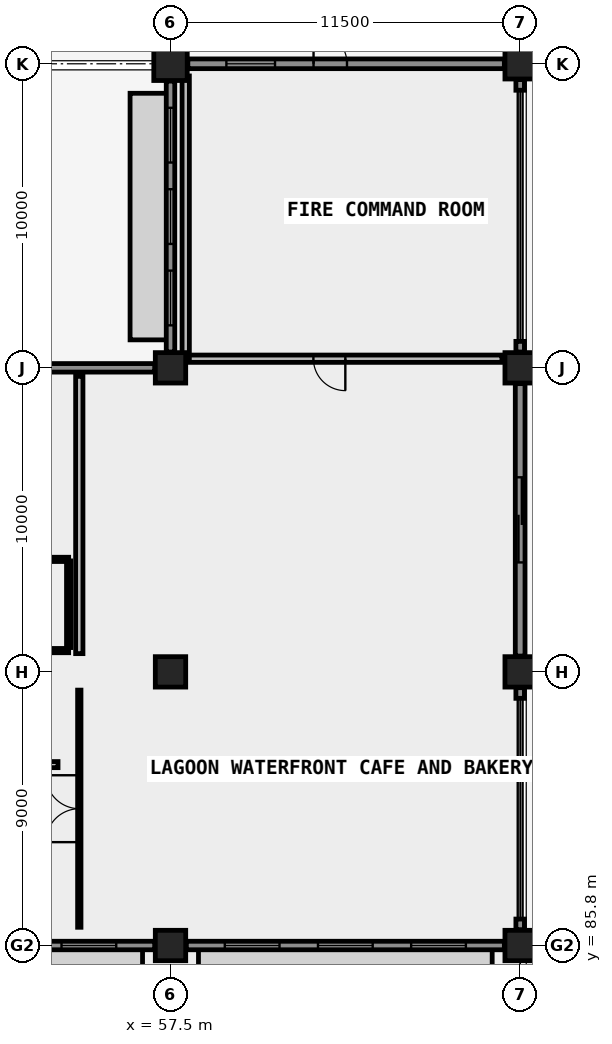
"""IFC4 building model, lengths in metres.
Left out: names, types, materials, properties, quantities, classifications, styles, units other than length and angle.
Written with IfcOpenShell. Run it as: python <this file> out.ifc"""

import sys

from ifc_helpers import new_model, si_unit, direction, frame, frame_2d, origin, origin_2d, place, context, subcontext, project, spatial, rectangle, extrude, element, fill, save


model = new_model("IFC4")
c1 = context("Model", 3, precision=1e-05, world=origin(), true_north=direction((0.0, 1.0)))
c2 = subcontext(c1, "Body", "Model", "MODEL_VIEW")
j1 = project(units=[si_unit("LENGTHUNIT", "METRE"), si_unit("PLANEANGLEUNIT", "RADIAN")], contexts=[c1])
p1 = place(None, origin())
s1 = spatial("IfcSite", under=j1, at=p1, CompositionType="ELEMENT")
p2 = place(p1, origin())
s2 = spatial("IfcBuilding", under=s1, at=p2, CompositionType="ELEMENT")
p3 = place(p2, origin())
s3 = spatial("IfcBuildingStorey", under=s2, at=p3, CompositionType="ELEMENT", Elevation=0.0)
for number, where, z_axis, x_axis in (
    (1, (57.5, 85.8, 0.0), (0.0, 0.0, 1.0), (1.0, 0.0, 0.0)),
    (2, (57.5, 94.8, 0.0), (0.0, 0.0, 1.0), (1.0, 0.0, 0.0)),
    (3, (57.5, 104.8, 0.0), (0.0, 0.0, 1.0), (1.0, 0.0, 0.0)),
):
    element("IfcColumn", number, at=place(p3, frame(where, z_axis=z_axis, x_axis=x_axis)), inside=s3, PredefinedType="COLUMN", context=c2, shape_type="SweptSolid", body=[
        extrude(rectangle(XDim=1.0, YDim=1.0, at=origin_2d()), origin(), (0.0, 0.0, 1.0), 4.2),
    ])
p4 = place(p3, frame((57.5, 114.8, 0.0), z_axis=(0.0, 0.0, 1.0), x_axis=(1.0, 0.0, 0.0)))
e4 = element("IfcColumn", 4, at=p4, inside=s3, PredefinedType="COLUMN", context=c2, shape_type="SweptSolid", body=[
    extrude(rectangle(XDim=1.1, YDim=1.1, at=origin_2d()), origin(), (0.0, 0.0, 1.0), 4.2),
])
for number, where, z_axis, x_axis in (
    (5, (69.0, 85.8, 0.0), (0.0, 0.0, 1.0), (1.0, 0.0, 0.0)),
    (6, (69.0, 94.8, 0.0), (0.0, 0.0, 1.0), (1.0, 0.0, 0.0)),
    (7, (69.0, 104.8, 0.0), (0.0, 0.0, 1.0), (1.0, 0.0, 0.0)),
    (8, (69.0, 114.8, 0.0), (0.0, 0.0, 1.0), (1.0, 0.0, 0.0)),
):
    element("IfcColumn", number, at=place(p3, frame(where, z_axis=z_axis, x_axis=x_axis)), inside=s3, PredefinedType="COLUMN", context=c2, shape_type="SweptSolid", body=[
        extrude(rectangle(XDim=1.0, YDim=1.0, at=origin_2d()), origin(), (0.0, 0.0, 1.0), 4.2),
    ])
p5 = place(p3, frame((46.52, 85.8, 0.0), z_axis=(0.0, 0.0, 1.0), x_axis=(1.0, 0.0, 0.0)))
e9 = element("IfcWall", 9, at=p5, inside=s3, PredefinedType="SOLIDWALL", context=c2, shape_type="SweptSolid", body=[
    extrude(rectangle(XDim=10.46, YDim=0.28, at=frame_2d((5.23, 0.0))), origin(), (0.0, 0.0, 1.0), 3.15),
])
p6 = place(p5, frame((1.265, 0.0, 0.85)))
e10 = element("IfcOpeningElement", 10, at=p6, cuts=e9, PredefinedType="OPENING", context=c2, shape_type="SweptSolid", body=[
    extrude(rectangle(XDim=1.8, YDim=1.95, at=frame_2d((0.9, 0.975))), frame((0.0, 0.15, 0.0), z_axis=(0.0, -1.0, 0.0), x_axis=(1.0, 0.0, 0.0)), (0.0, 0.0, 1.0), 0.3),
])
p7 = place(p5, frame((4.33, 0.0, 0.85)))
e11 = element("IfcOpeningElement", 11, at=p7, cuts=e9, PredefinedType="OPENING", context=c2, shape_type="SweptSolid", body=[
    extrude(rectangle(XDim=1.8, YDim=1.95, at=frame_2d((0.9, 0.975))), frame((0.0, 0.15, 0.0), z_axis=(0.0, -1.0, 0.0), x_axis=(1.0, 0.0, 0.0)), (0.0, 0.0, 1.0), 0.3),
])
p8 = place(p5, frame((7.395, 0.0, 0.85)))
e12 = element("IfcOpeningElement", 12, at=p8, cuts=e9, PredefinedType="OPENING", context=c2, shape_type="SweptSolid", body=[
    extrude(rectangle(XDim=1.8, YDim=1.95, at=frame_2d((0.9, 0.975))), frame((0.0, 0.15, 0.0), z_axis=(0.0, -1.0, 0.0), x_axis=(1.0, 0.0, 0.0)), (0.0, 0.0, 1.0), 0.3),
])
p9 = place(p3, frame((58.02, 85.8, 0.0), z_axis=(0.0, 0.0, 1.0), x_axis=(1.0, 0.0, 0.0)))
e13 = element("IfcWall", 13, at=p9, inside=s3, PredefinedType="SOLIDWALL", context=c2, shape_type="SweptSolid", body=[
    extrude(rectangle(XDim=10.46, YDim=0.28, at=frame_2d((5.23, 0.0))), origin(), (0.0, 0.0, 1.0), 3.15),
])
p10 = place(p9, frame((1.265, 0.0, 0.85)))
e14 = element("IfcOpeningElement", 14, at=p10, cuts=e13, PredefinedType="OPENING", context=c2, shape_type="SweptSolid", body=[
    extrude(rectangle(XDim=1.8, YDim=1.95, at=frame_2d((0.9, 0.975))), frame((0.0, 0.15, 0.0), z_axis=(0.0, -1.0, 0.0), x_axis=(1.0, 0.0, 0.0)), (0.0, 0.0, 1.0), 0.3),
])
p11 = place(p9, frame((4.33, 0.0, 0.85)))
e15 = element("IfcOpeningElement", 15, at=p11, cuts=e13, PredefinedType="OPENING", context=c2, shape_type="SweptSolid", body=[
    extrude(rectangle(XDim=1.8, YDim=1.95, at=frame_2d((0.9, 0.975))), frame((0.0, 0.15, 0.0), z_axis=(0.0, -1.0, 0.0), x_axis=(1.0, 0.0, 0.0)), (0.0, 0.0, 1.0), 0.3),
])
p12 = place(p9, frame((7.395, 0.0, 0.85)))
e16 = element("IfcOpeningElement", 16, at=p12, cuts=e13, PredefinedType="OPENING", context=c2, shape_type="SweptSolid", body=[
    extrude(rectangle(XDim=1.8, YDim=1.95, at=frame_2d((0.9, 0.975))), frame((0.0, 0.15, 0.0), z_axis=(0.0, -1.0, 0.0), x_axis=(1.0, 0.0, 0.0)), (0.0, 0.0, 1.0), 0.3),
])
p13 = place(p3, frame((69.0, 86.32, 0.0), z_axis=(0.0, 0.0, 1.0), x_axis=(0.0, 1.0, 0.0)))
e17 = element("IfcWall", 17, at=p13, inside=s3, PredefinedType="SOLIDWALL", context=c2, shape_type="SweptSolid", body=[
    extrude(rectangle(XDim=0.35, YDim=0.28, at=frame_2d((0.175, 0.0))), origin(), (0.0, 0.0, 1.0), 3.93),
])
p14 = place(p3, frame((69.0, 93.93, 0.0), z_axis=(0.0, 0.0, 1.0), x_axis=(0.0, 1.0, 0.0)))
e18 = element("IfcWall", 18, at=p14, inside=s3, PredefinedType="SOLIDWALL", context=c2, shape_type="SweptSolid", body=[
    extrude(rectangle(XDim=0.35, YDim=0.28, at=frame_2d((0.175, 0.0))), origin(), (0.0, 0.0, 1.0), 3.93),
])
p15 = place(p3, frame((69.0, 95.32, 0.0), z_axis=(0.0, 0.0, 1.0), x_axis=(0.0, 1.0, 0.0)))
e19 = element("IfcWall", 19, at=p15, inside=s3, PredefinedType="SOLIDWALL", context=c2, shape_type="SweptSolid", body=[
    extrude(rectangle(XDim=8.96, YDim=0.32, at=frame_2d((4.48, 0.0))), origin(), (0.0, 0.0, 1.0), 3.15),
])
p16 = place(p15, frame((3.08, 0.0, 0.0)))
e20 = element("IfcOpeningElement", 20, at=p16, cuts=e19, PredefinedType="OPENING", context=c2, shape_type="SweptSolid", body=[
    extrude(rectangle(XDim=2.8, YDim=2.45, at=frame_2d((1.4, 1.225))), frame((0.0, 0.17, 0.0), z_axis=(0.0, -1.0, 0.0), x_axis=(1.0, 0.0, 0.0)), (0.0, 0.0, 1.0), 0.34),
])
p17 = place(p3, frame((69.0, 105.32, 0.0), z_axis=(0.0, 0.0, 1.0), x_axis=(0.0, 1.0, 0.0)))
e21 = element("IfcWall", 21, at=p17, inside=s3, PredefinedType="SOLIDWALL", context=c2, shape_type="SweptSolid", body=[
    extrude(rectangle(XDim=0.35, YDim=0.28, at=frame_2d((0.175, 0.0))), origin(), (0.0, 0.0, 1.0), 3.93),
])
p18 = place(p3, frame((69.0, 113.93, 0.0), z_axis=(0.0, 0.0, 1.0), x_axis=(0.0, 1.0, 0.0)))
e22 = element("IfcWall", 22, at=p18, inside=s3, PredefinedType="SOLIDWALL", context=c2, shape_type="SweptSolid", body=[
    extrude(rectangle(XDim=0.35, YDim=0.28, at=frame_2d((0.175, 0.0))), origin(), (0.0, 0.0, 1.0), 3.93),
])
p19 = place(p3, frame((58.07, 114.8, 0.0), z_axis=(0.0, 0.0, 1.0), x_axis=(1.0, 0.0, 0.0)))
e23 = element("IfcWall", 23, at=p19, inside=s3, PredefinedType="SOLIDWALL", context=c2, shape_type="SweptSolid", body=[
    extrude(rectangle(XDim=10.41, YDim=0.32, at=frame_2d((5.205, 0.0))), origin(), (0.0, 0.0, 1.0), 3.15),
])
p20 = place(p19, frame((4.135, 0.0, 0.0)))
e24 = element("IfcOpeningElement", 24, at=p20, cuts=e23, PredefinedType="OPENING", context=c2, shape_type="SweptSolid", body=[
    extrude(rectangle(XDim=1.1, YDim=2.15, at=frame_2d((0.55, 1.075))), frame((0.0, 0.17, 0.0), z_axis=(0.0, -1.0, 0.0), x_axis=(1.0, 0.0, 0.0)), (0.0, 0.0, 1.0), 0.34),
])
p21 = place(p19, frame((1.267, 0.0, 0.78)))
e25 = element("IfcOpeningElement", 25, at=p21, cuts=e23, PredefinedType="OPENING", context=c2, shape_type="SweptSolid", body=[
    extrude(rectangle(XDim=1.6, YDim=1.4, at=frame_2d((0.8, 0.7))), frame((0.0, 0.17, 0.0), z_axis=(0.0, -1.0, 0.0), x_axis=(1.0, 0.0, 0.0)), (0.0, 0.0, 1.0), 0.34),
])
p22 = place(p3, frame((57.5, 105.32, 0.0), z_axis=(0.0, 0.0, 1.0), x_axis=(0.0, 1.0, 0.0)))
e26 = element("IfcWall", 26, at=p22, inside=s3, PredefinedType="SOLIDWALL", context=c2, shape_type="SweptSolid", body=[
    extrude(rectangle(XDim=8.91, YDim=0.28, at=frame_2d((4.455, 0.0))), origin(), (0.0, 0.0, 1.0), 3.15),
])
p23 = place(p22, frame((0.877, 0.0, 0.85)))
e27 = element("IfcOpeningElement", 27, at=p23, cuts=e26, PredefinedType="OPENING", context=c2, shape_type="SweptSolid", body=[
    extrude(rectangle(XDim=1.8, YDim=1.95, at=frame_2d((0.9, 0.975))), frame((0.0, 0.15, 0.0), z_axis=(0.0, -1.0, 0.0), x_axis=(1.0, 0.0, 0.0)), (0.0, 0.0, 1.0), 0.3),
])
p24 = place(p22, frame((3.555, 0.0, 0.85)))
e28 = element("IfcOpeningElement", 28, at=p24, cuts=e26, PredefinedType="OPENING", context=c2, shape_type="SweptSolid", body=[
    extrude(rectangle(XDim=1.8, YDim=1.95, at=frame_2d((0.9, 0.975))), frame((0.0, 0.15, 0.0), z_axis=(0.0, -1.0, 0.0), x_axis=(1.0, 0.0, 0.0)), (0.0, 0.0, 1.0), 0.3),
])
p25 = place(p22, frame((6.232, 0.0, 0.85)))
e29 = element("IfcOpeningElement", 29, at=p25, cuts=e26, PredefinedType="OPENING", context=c2, shape_type="SweptSolid", body=[
    extrude(rectangle(XDim=1.8, YDim=1.95, at=frame_2d((0.9, 0.975))), frame((0.0, 0.15, 0.0), z_axis=(0.0, -1.0, 0.0), x_axis=(1.0, 0.0, 0.0)), (0.0, 0.0, 1.0), 0.3),
])
p26 = place(p3, frame((46.52, 104.8, 0.0), z_axis=(0.0, 0.0, 1.0), x_axis=(1.0, 0.0, 0.0)))
e30 = element("IfcWall", 30, at=p26, inside=s3, PredefinedType="SOLIDWALL", context=c2, shape_type="SweptSolid", body=[
    extrude(rectangle(XDim=10.46, YDim=0.28, at=frame_2d((5.23, 0.0))), origin(), (0.0, 0.0, 1.0), 3.15),
])
p27 = place(p26, frame((4.23, 0.0, 0.0)))
e31 = element("IfcOpeningElement", 31, at=p27, cuts=e30, PredefinedType="OPENING", context=c2, shape_type="SweptSolid", body=[
    extrude(rectangle(XDim=2.0, YDim=2.4, at=frame_2d((1.0, 1.2))), frame((0.0, 0.15, 0.0), z_axis=(0.0, -1.0, 0.0), x_axis=(1.0, 0.0, 0.0)), (0.0, 0.0, 1.0), 0.3),
])
p28 = place(p26, frame((1.215, 0.0, 0.78)))
e32 = element("IfcOpeningElement", 32, at=p28, cuts=e30, PredefinedType="OPENING", context=c2, shape_type="SweptSolid", body=[
    extrude(rectangle(XDim=1.8, YDim=1.95, at=frame_2d((0.9, 0.975))), frame((0.0, 0.15, 0.0), z_axis=(0.0, -1.0, 0.0), x_axis=(1.0, 0.0, 0.0)), (0.0, 0.0, 1.0), 0.3),
])
p29 = place(p3, frame((47.55, 95.5, 0.0), z_axis=(0.0, 0.0, 1.0), x_axis=(1.0, 0.0, 0.0)))
e33 = element("IfcWall", 33, at=p29, inside=s3, PredefinedType="PLUMBINGWALL", context=c2, shape_type="SweptSolid", body=[
    extrude(rectangle(XDim=6.6, YDim=0.14, at=frame_2d((3.3, 0.0))), origin(), (0.0, 0.0, 1.0), 3.88),
])
p30 = place(p29, frame((0.72, 0.0, 0.0)))
e34 = element("IfcOpeningElement", 34, at=p30, cuts=e33, PredefinedType="OPENING", context=c2, shape_type="SweptSolid", body=[
    extrude(rectangle(XDim=0.95, YDim=2.1, at=frame_2d((0.475, 1.05))), frame((0.0, 0.08, 0.0), z_axis=(0.0, -1.0, 0.0), x_axis=(1.0, 0.0, 0.0)), (0.0, 0.0, 1.0), 0.16),
])
p31 = place(p29, frame((2.9, 0.0, 0.0)))
e35 = element("IfcOpeningElement", 35, at=p31, cuts=e33, PredefinedType="OPENING", context=c2, shape_type="SweptSolid", body=[
    extrude(rectangle(XDim=0.92, YDim=2.1, at=frame_2d((0.46, 1.05))), frame((0.0, 0.08, 0.0), z_axis=(0.0, -1.0, 0.0), x_axis=(1.0, 0.0, 0.0)), (0.0, 0.0, 1.0), 0.16),
])
p32 = place(p29, frame((5.0, 0.0, 0.0)))
e36 = element("IfcOpeningElement", 36, at=p32, cuts=e33, PredefinedType="OPENING", context=c2, shape_type="SweptSolid", body=[
    extrude(rectangle(XDim=0.92, YDim=2.1, at=frame_2d((0.46, 1.05))), frame((0.0, 0.08, 0.0), z_axis=(0.0, -1.0, 0.0), x_axis=(1.0, 0.0, 0.0)), (0.0, 0.0, 1.0), 0.16),
])
p33 = place(p3, frame((54.15, 95.6, 0.0), z_axis=(0.0, 0.0, 1.0), x_axis=(0.0, 1.0, 0.0)))
e37 = element("IfcWall", 37, at=p33, inside=s3, PredefinedType="PLUMBINGWALL", context=c2, shape_type="SweptSolid", body=[
    extrude(rectangle(XDim=2.85, YDim=0.14, at=frame_2d((1.425, 0.0))), origin(), (0.0, 0.0, 1.0), 3.88),
])
p34 = place(p3, frame((47.55, 98.5, 0.0), z_axis=(0.0, 0.0, 1.0), x_axis=(1.0, 0.0, 0.0)))
e38 = element("IfcWall", 38, at=p34, inside=s3, PredefinedType="PLUMBINGWALL", context=c2, shape_type="SweptSolid", body=[
    extrude(rectangle(XDim=6.6, YDim=0.14, at=frame_2d((3.3, 0.0))), origin(), (0.0, 0.0, 1.0), 3.88),
])
p35 = place(p3, frame((24.4, 91.75, 0.0), z_axis=(0.0, 0.0, 1.0), x_axis=(1.0, 0.0, 0.0)))
e39 = element("IfcWall", 39, at=p35, inside=s3, PredefinedType="PARTITIONING", context=c2, shape_type="SweptSolid", body=[
    extrude(rectangle(XDim=29.4, YDim=0.2, at=frame_2d((14.7, 0.0))), origin(), (0.0, 0.0, 1.0), 3.88),
])
p36 = place(p35, frame((4.2, 0.0, 0.0)))
e40 = element("IfcOpeningElement", 40, at=p36, cuts=e39, PredefinedType="OPENING", context=c2, shape_type="SweptSolid", body=[
    extrude(rectangle(XDim=1.8, YDim=2.2, at=frame_2d((0.9, 1.1))), frame((0.0, 0.11, 0.0), z_axis=(0.0, -1.0, 0.0), x_axis=(1.0, 0.0, 0.0)), (0.0, 0.0, 1.0), 0.22),
])
p37 = place(p35, frame((16.5, 0.0, 0.0)))
e41 = element("IfcOpeningElement", 41, at=p37, cuts=e39, PredefinedType="OPENING", context=c2, shape_type="SweptSolid", body=[
    extrude(rectangle(XDim=0.98, YDim=2.15, at=frame_2d((0.49, 1.075))), frame((0.0, 0.11, 0.0), z_axis=(0.0, -1.0, 0.0), x_axis=(1.0, 0.0, 0.0)), (0.0, 0.0, 1.0), 0.22),
])
p38 = place(p3, frame((58.0, 105.1, 0.0), z_axis=(0.0, 0.0, 1.0), x_axis=(1.0, 0.0, 0.0)))
e42 = element("IfcWall", 42, at=p38, inside=s3, PredefinedType="SOLIDWALL", context=c2, shape_type="SweptSolid", body=[
    extrude(rectangle(XDim=10.4, YDim=0.24, at=frame_2d((5.2, 0.0))), origin(), (0.0, 0.0, 1.0), 3.88),
])
p39 = place(p38, frame((4.2, 0.0, 0.0)))
e43 = element("IfcOpeningElement", 43, at=p39, cuts=e42, PredefinedType="OPENING", context=c2, shape_type="SweptSolid", body=[
    extrude(rectangle(XDim=1.05, YDim=2.15, at=frame_2d((0.525, 1.075))), frame((0.0, 0.13, 0.0), z_axis=(0.0, -1.0, 0.0), x_axis=(1.0, 0.0, 0.0)), (0.0, 0.0, 1.0), 0.26),
])
p40 = place(p3, frame((58.0, 105.1, 0.0), z_axis=(0.0, 0.0, 1.0), x_axis=(0.0, 1.0, 0.0)))
e44 = element("IfcWall", 44, at=p40, inside=s3, PredefinedType="SOLIDWALL", context=c2, shape_type="SweptSolid", body=[
    extrude(rectangle(XDim=9.3, YDim=0.24, at=frame_2d((4.65, 0.0))), origin(), (0.0, 0.0, 1.0), 3.88),
])
p41 = place(p3, frame((54.5, 86.4, 0.0), z_axis=(0.0, 0.0, 1.0), x_axis=(0.0, 1.0, 0.0)))
e45 = element("IfcWall", 45, at=p41, inside=s3, PredefinedType="MOVABLE", context=c2, shape_type="SweptSolid", body=[
    extrude(rectangle(XDim=7.8, YDim=0.11, at=frame_2d((3.9, 0.0))), origin(), (0.0, 0.0, 1.0), 3.88),
])
p42 = place(p41, frame((2.8, 0.0, 0.0)))
e46 = element("IfcOpeningElement", 46, at=p42, cuts=e45, PredefinedType="OPENING", context=c2, shape_type="SweptSolid", body=[
    extrude(rectangle(XDim=2.2, YDim=2.4, at=frame_2d((1.1, 1.2))), frame((0.0, 0.065, 0.0), z_axis=(0.0, -1.0, 0.0), x_axis=(1.0, 0.0, 0.0)), (0.0, 0.0, 1.0), 0.13),
])
p43 = place(p3, frame((54.5, 95.4, 0.0), z_axis=(0.0, 0.0, 1.0), x_axis=(0.0, 1.0, 0.0)))
e47 = element("IfcWall", 47, at=p43, inside=s3, PredefinedType="SOLIDWALL", context=c2, shape_type="SweptSolid", body=[
    extrude(rectangle(XDim=9.12, YDim=0.24, at=frame_2d((4.56, 0.0))), origin(), (0.0, 0.0, 1.0), 3.88),
])
p44 = place(p8, origin())
e48 = element("IfcWindow", 48, at=p44, inside=s3, PartitioningType="SINGLE_PANEL", PredefinedType="WINDOW", context=c2, shape_type="SweptSolid", body=[
    extrude(rectangle(XDim=1.8, YDim=1.95, at=frame_2d((0.9, 0.975))), frame((0.0, 0.03, 0.0), z_axis=(0.0, -1.0, 0.0), x_axis=(1.0, 0.0, 0.0)), (0.0, 0.0, 1.0), 0.06),
])
fill(e12, e48)
p45 = place(p10, origin())
e49 = element("IfcWindow", 49, at=p45, inside=s3, PartitioningType="SINGLE_PANEL", PredefinedType="WINDOW", context=c2, shape_type="SweptSolid", body=[
    extrude(rectangle(XDim=1.8, YDim=1.95, at=frame_2d((0.9, 0.975))), frame((0.0, 0.03, 0.0), z_axis=(0.0, -1.0, 0.0), x_axis=(1.0, 0.0, 0.0)), (0.0, 0.0, 1.0), 0.06),
])
fill(e14, e49)
p46 = place(p11, origin())
e50 = element("IfcWindow", 50, at=p46, inside=s3, PartitioningType="SINGLE_PANEL", PredefinedType="WINDOW", context=c2, shape_type="SweptSolid", body=[
    extrude(rectangle(XDim=1.8, YDim=1.95, at=frame_2d((0.9, 0.975))), frame((0.0, 0.03, 0.0), z_axis=(0.0, -1.0, 0.0), x_axis=(1.0, 0.0, 0.0)), (0.0, 0.0, 1.0), 0.06),
])
fill(e15, e50)
p47 = place(p12, origin())
e51 = element("IfcWindow", 51, at=p47, inside=s3, PartitioningType="SINGLE_PANEL", PredefinedType="WINDOW", context=c2, shape_type="SweptSolid", body=[
    extrude(rectangle(XDim=1.8, YDim=1.95, at=frame_2d((0.9, 0.975))), frame((0.0, 0.03, 0.0), z_axis=(0.0, -1.0, 0.0), x_axis=(1.0, 0.0, 0.0)), (0.0, 0.0, 1.0), 0.06),
])
fill(e16, e51)
p48 = place(p16, origin())
e52 = element("IfcDoor", 52, at=p48, inside=s3, OperationType="SLIDING_TO_LEFT", PredefinedType="DOOR", context=c2, shape_type="SweptSolid", body=[
    extrude(rectangle(XDim=2.8, YDim=2.45, at=frame_2d((1.4, 1.225))), frame((0.0, 0.025, 0.0), z_axis=(0.0, -1.0, 0.0), x_axis=(1.0, 0.0, 0.0)), (0.0, 0.0, 1.0), 0.05),
])
fill(e20, e52)
p49 = place(p20, origin())
e53 = element("IfcDoor", 53, at=p49, inside=s3, OperationType="SINGLE_SWING_LEFT", PredefinedType="DOOR", context=c2, shape_type="SweptSolid", body=[
    extrude(rectangle(XDim=1.1, YDim=2.15, at=frame_2d((0.55, 1.075))), frame((0.0, 0.025, 0.0), z_axis=(0.0, -1.0, 0.0), x_axis=(1.0, 0.0, 0.0)), (0.0, 0.0, 1.0), 0.05),
])
fill(e24, e53)
p50 = place(p21, origin())
e54 = element("IfcWindow", 54, at=p50, inside=s3, PartitioningType="SINGLE_PANEL", PredefinedType="WINDOW", context=c2, shape_type="SweptSolid", body=[
    extrude(rectangle(XDim=1.6, YDim=1.4, at=frame_2d((0.8, 0.7))), frame((0.0, 0.03, 0.0), z_axis=(0.0, -1.0, 0.0), x_axis=(1.0, 0.0, 0.0)), (0.0, 0.0, 1.0), 0.06),
])
fill(e25, e54)
p51 = place(p23, origin())
e55 = element("IfcWindow", 55, at=p51, inside=s3, PartitioningType="SINGLE_PANEL", PredefinedType="WINDOW", context=c2, shape_type="SweptSolid", body=[
    extrude(rectangle(XDim=1.8, YDim=1.95, at=frame_2d((0.9, 0.975))), frame((0.0, 0.03, 0.0), z_axis=(0.0, -1.0, 0.0), x_axis=(1.0, 0.0, 0.0)), (0.0, 0.0, 1.0), 0.06),
])
fill(e27, e55)
p52 = place(p24, origin())
e56 = element("IfcWindow", 56, at=p52, inside=s3, PartitioningType="SINGLE_PANEL", PredefinedType="WINDOW", context=c2, shape_type="SweptSolid", body=[
    extrude(rectangle(XDim=1.8, YDim=1.95, at=frame_2d((0.9, 0.975))), frame((0.0, 0.03, 0.0), z_axis=(0.0, -1.0, 0.0), x_axis=(1.0, 0.0, 0.0)), (0.0, 0.0, 1.0), 0.06),
])
fill(e28, e56)
p53 = place(p25, origin())
e57 = element("IfcWindow", 57, at=p53, inside=s3, PartitioningType="SINGLE_PANEL", PredefinedType="WINDOW", context=c2, shape_type="SweptSolid", body=[
    extrude(rectangle(XDim=1.8, YDim=1.95, at=frame_2d((0.9, 0.975))), frame((0.0, 0.03, 0.0), z_axis=(0.0, -1.0, 0.0), x_axis=(1.0, 0.0, 0.0)), (0.0, 0.0, 1.0), 0.06),
])
fill(e29, e57)
p54 = place(p39, origin())
e58 = element("IfcDoor", 58, at=p54, inside=s3, OperationType="SINGLE_SWING_RIGHT", PredefinedType="DOOR", context=c2, shape_type="SweptSolid", body=[
    extrude(rectangle(XDim=1.05, YDim=2.15, at=frame_2d((0.525, 1.075))), frame((0.0, 0.025, 0.0), z_axis=(0.0, -1.0, 0.0), x_axis=(1.0, 0.0, 0.0)), (0.0, 0.0, 1.0), 0.05),
])
fill(e43, e58)
p55 = place(p42, origin())
e59 = element("IfcDoor", 59, at=p55, inside=s3, OperationType="DOUBLE_DOOR_SINGLE_SWING", PredefinedType="DOOR", context=c2, shape_type="SweptSolid", body=[
    extrude(rectangle(XDim=2.2, YDim=2.4, at=frame_2d((1.1, 1.2))), frame((0.0, 0.025, 0.0), z_axis=(0.0, -1.0, 0.0), x_axis=(1.0, 0.0, 0.0)), (0.0, 0.0, 1.0), 0.05),
])
fill(e46, e59)
save(model, sys.argv[1])
